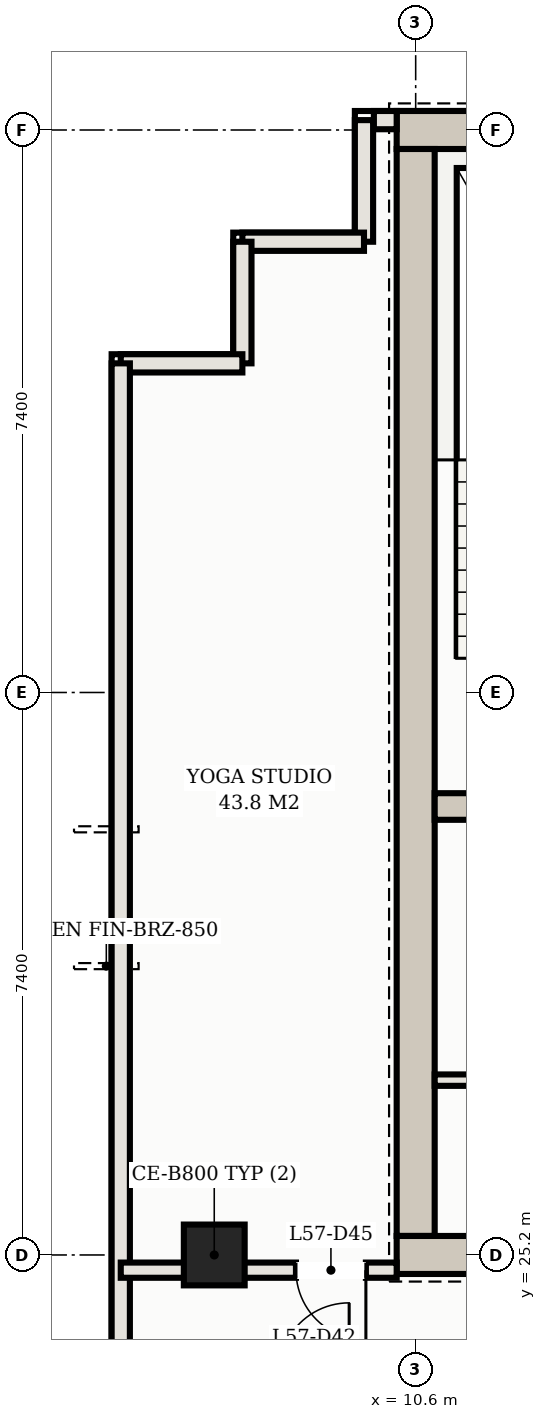
"""IFC4 building model, lengths in metres.
Left out: names, types, materials, properties, quantities, classifications, styles, units other than length and angle.
Written with IfcOpenShell. Run it as: python <this file> out.ifc"""

import sys

from ifc_helpers import new_model, si_unit, direction, frame, frame_2d, origin, origin_2d, place, context, subcontext, project, spatial, rectangle, hollow_rectangle, extrude, element, fill, save


model = new_model("IFC4")
c1 = context("Model", 3, precision=1e-05, world=origin(), true_north=direction((0.0, 1.0)))
c2 = subcontext(c1, "Body", "Model", "MODEL_VIEW")
j1 = project(units=[si_unit("LENGTHUNIT", "METRE"), si_unit("PLANEANGLEUNIT", "RADIAN")], contexts=[c1])
p1 = place(None, origin())
s1 = spatial("IfcSite", under=j1, at=p1, CompositionType="ELEMENT")
p2 = place(p1, origin())
s2 = spatial("IfcBuilding", under=s1, at=p2, CompositionType="ELEMENT")
p3 = place(p2, frame((0.0, 0.0, 209.9)))
s3 = spatial("IfcBuildingStorey", under=s2, at=p3, CompositionType="ELEMENT", Elevation=209.9)
p4 = place(p3, frame((10.35, 40.0, 0.0), z_axis=(0.0, 0.0, 1.0), x_axis=(1.0, 0.0, 0.0)))
e1 = element("IfcWall", 1, at=p4, inside=s3, PredefinedType="SHEAR", context=c2, shape_type="SweptSolid", body=[
    extrude(rectangle(XDim=32.3, YDim=0.5, at=frame_2d((16.15, 0.0))), origin(), (0.0, 0.0, 1.0), 3.11),
])
p5 = place(p3, frame((10.6, 25.45, 0.0), z_axis=(0.0, 0.0, 1.0), x_axis=(0.0, 1.0, 0.0)))
e2 = element("IfcWall", 2, at=p5, inside=s3, PredefinedType="SHEAR", context=c2, shape_type="SweptSolid", body=[
    extrude(rectangle(XDim=14.3, YDim=0.5, at=frame_2d((7.15, 0.0))), origin(), (0.0, 0.0, 1.0), 3.11),
])
p6 = place(p3, frame((10.35, 25.2, 0.0), z_axis=(0.0, 0.0, 1.0), x_axis=(1.0, 0.0, 0.0)))
e3 = element("IfcWall", 3, at=p6, inside=s3, PredefinedType="SHEAR", context=c2, shape_type="SweptSolid", body=[
    extrude(rectangle(XDim=8.05, YDim=0.5, at=frame_2d((4.025, 0.0))), origin(), (0.0, 0.0, 1.0), 3.11),
])
p7 = place(p6, frame((6.15, 0.0, 0.0)))
e4 = element("IfcOpeningElement", 4, at=p7, cuts=e3, PredefinedType="OPENING", context=c2, shape_type="SweptSolid", body=[
    extrude(rectangle(XDim=1.25, YDim=2.2, at=frame_2d((0.625, 1.1))), frame((0.0, 0.26, 0.0), z_axis=(0.0, -1.0, 0.0), x_axis=(1.0, 0.0, 0.0)), (0.0, 0.0, 1.0), 0.52),
])
p8 = place(p3, frame((10.85, 31.1, 0.0), z_axis=(0.0, 0.0, 1.0), x_axis=(1.0, 0.0, 0.0)))
e5 = element("IfcWall", 5, at=p8, inside=s3, PredefinedType="SHEAR", context=c2, shape_type="SweptSolid", body=[
    extrude(rectangle(XDim=4.075, YDim=0.35, at=frame_2d((2.038, 0.0))), origin(), (0.0, 0.0, 1.0), 3.11),
])
p9 = place(p3, frame((7.95, 25.2, 0.0), z_axis=(0.0, 0.0, 1.0), x_axis=(1.0, 0.0, 0.0)))
e6 = element("IfcColumn", 6, at=p9, inside=s3, PredefinedType="COLUMN", context=c2, shape_type="SweptSolid", body=[
    extrude(hollow_rectangle(XDim=0.8, YDim=0.8, WallThickness=0.028, at=origin_2d()), origin(), (0.0, 0.0, 1.0), 3.3),
])
p10 = place(p3, frame((10.35, 40.13, 0.0), z_axis=(0.0, 0.0, 1.0), x_axis=(-1.0, 0.0, 0.0)))
e7 = element("IfcWall", 7, at=p10, inside=s3, PredefinedType="SOLIDWALL", context=c2, shape_type="SweptSolid", body=[
    extrude(rectangle(XDim=0.3, YDim=0.24, at=frame_2d((0.15, 0.0))), origin(), (0.0, 0.0, 1.0), 3.11),
])
for number, where, z_axis, x_axis in (
    (8, (9.92, 40.13, 0.0), (0.0, 0.0, 1.0), (0.0, -1.0, 0.0)),
    (9, (9.92, 38.53, 0.0), (0.0, 0.0, 1.0), (-1.0, 0.0, 0.0)),
):
    element("IfcWall", number, at=place(p3, frame(where, z_axis=z_axis, x_axis=x_axis)), inside=s3, PredefinedType="SOLIDWALL", context=c2, shape_type="SweptSolid", body=[
        extrude(rectangle(XDim=1.6, YDim=0.24, at=frame_2d((0.8, 0.0))), origin(), (0.0, 0.0, 1.0), 3.11),
    ])
for number, where, z_axis, x_axis in (
    (10, (8.32, 38.53, 0.0), (0.0, 0.0, 1.0), (0.0, -1.0, 0.0)),
    (11, (8.32, 36.93, 0.0), (0.0, 0.0, 1.0), (-1.0, 0.0, 0.0)),
):
    element("IfcWall", number, at=place(p3, frame(where, z_axis=z_axis, x_axis=x_axis)), inside=s3, PredefinedType="SOLIDWALL", context=c2, shape_type="SweptSolid", body=[
        extrude(rectangle(XDim=1.6, YDim=0.24, at=frame_2d((0.8, 0.0))), origin(), (0.0, 0.0, 1.0), 3.11),
    ])
p11 = place(p3, frame((6.72, 36.93, 0.0), z_axis=(0.0, 0.0, 1.0), x_axis=(0.0, -1.0, 0.0)))
e12 = element("IfcWall", 12, at=p11, inside=s3, PredefinedType="SOLIDWALL", context=c2, shape_type="SweptSolid", body=[
    extrude(rectangle(XDim=26.41, YDim=0.24, at=frame_2d((13.205, 0.0))), origin(), (0.0, 0.0, 1.0), 3.11),
])
p12 = place(p11, frame((18.13, 0.0, 0.0)))
e13 = element("IfcOpeningElement", 13, at=p12, cuts=e12, PredefinedType="OPENING", context=c2, shape_type="SweptSolid", body=[
    extrude(rectangle(XDim=1.8, YDim=2.2, at=frame_2d((0.9, 1.1))), frame((0.0, 0.13, 0.0), z_axis=(0.0, -1.0, 0.0), x_axis=(1.0, 0.0, 0.0)), (0.0, 0.0, 1.0), 0.26),
])
p13 = place(p3, frame((10.85, 27.5, 0.0), z_axis=(0.0, 0.0, 1.0), x_axis=(1.0, 0.0, 0.0)))
e14 = element("IfcWall", 14, at=p13, inside=s3, PredefinedType="PARTITIONING", context=c2, shape_type="SweptSolid", body=[
    extrude(rectangle(XDim=5.0, YDim=0.15, at=frame_2d((2.5, 0.0))), origin(), (0.0, 0.0, 1.0), 2.43),
])
p14 = place(p3, frame((6.72, 25.0, 0.0), z_axis=(0.0, 0.0, 1.0), x_axis=(1.0, 0.0, 0.0)))
e15 = element("IfcWall", 15, at=p14, inside=s3, PredefinedType="PARTITIONING", context=c2, shape_type="SweptSolid", body=[
    extrude(rectangle(XDim=3.63, YDim=0.2, at=frame_2d((1.815, 0.0))), origin(), (0.0, 0.0, 1.0), 2.43),
])
p15 = place(p14, frame((2.305, 0.0, 0.0)))
e16 = element("IfcOpeningElement", 16, at=p15, cuts=e15, PredefinedType="OPENING", context=c2, shape_type="SweptSolid", body=[
    extrude(rectangle(XDim=0.92, YDim=2.15, at=frame_2d((0.46, 1.075))), frame((0.0, 0.11, 0.0), z_axis=(0.0, -1.0, 0.0), x_axis=(1.0, 0.0, 0.0)), (0.0, 0.0, 1.0), 0.22),
])
p16 = place(p15, frame((0.92, 0.0, 0.0), z_axis=(0.0, 0.0, 1.0), x_axis=(-1.0, 0.0, 0.0)))
e17 = element("IfcDoor", 17, at=p16, inside=s3, OperationType="SINGLE_SWING_LEFT", PredefinedType="DOOR", context=c2, shape_type="SweptSolid", body=[
    extrude(rectangle(XDim=0.92, YDim=2.15, at=frame_2d((0.46, 1.075))), frame((0.0, 0.025, 0.0), z_axis=(0.0, -1.0, 0.0), x_axis=(1.0, 0.0, 0.0)), (0.0, 0.0, 1.0), 0.05),
])
fill(e16, e17)
save(model, sys.argv[1])
